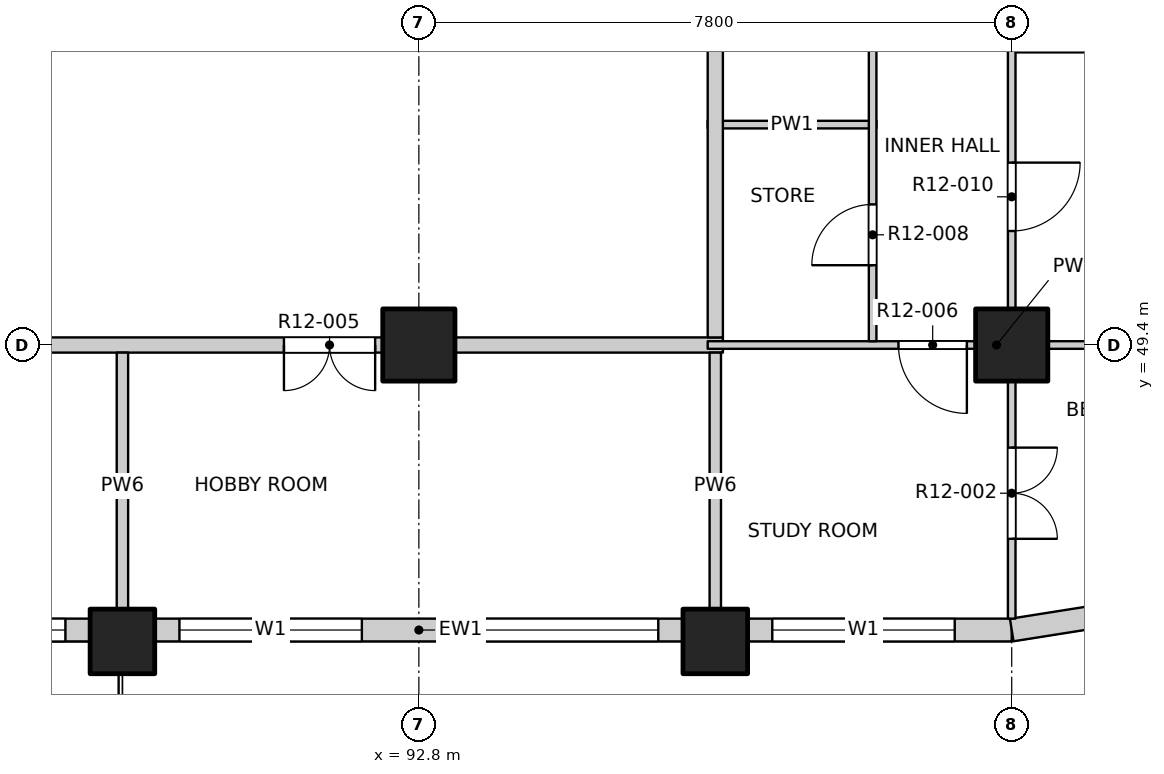
"""IFC4 building model, lengths in metres.
Left out: names, types, materials, properties, quantities, classifications, styles, units other than length and angle.
Written with IfcOpenShell. Run it as: python <this file> out.ifc"""

import sys

from ifc_helpers import new_model, si_unit, direction, frame, frame_2d, origin, origin_2d, place, context, subcontext, project, spatial, rectangle, extrude, element, fill, save


model = new_model("IFC4")
c1 = context("Model", 3, precision=1e-05, world=origin(), true_north=direction((0.0, 1.0)))
c2 = subcontext(c1, "Body", "Model", "MODEL_VIEW")
j1 = project(units=[si_unit("LENGTHUNIT", "METRE"), si_unit("PLANEANGLEUNIT", "RADIAN")], contexts=[c1])
p1 = place(None, origin())
s1 = spatial("IfcSite", under=j1, at=p1, CompositionType="ELEMENT")
p2 = place(p1, origin())
s2 = spatial("IfcBuilding", under=s1, at=p2, CompositionType="ELEMENT")
p3 = place(p2, frame((0.0, 0.0, 137.3)))
s3 = spatial("IfcBuildingStorey", under=s2, at=p3, CompositionType="ELEMENT", Elevation=137.3)
for number, where, z_axis, x_axis in (
    (1, (88.9, 45.5, -0.25), (0.0, 0.0, 1.0), (1.0, 0.0, 0.0)),
    (2, (96.7, 45.5, -0.25), (0.0, 0.0, 1.0), (1.0, 0.0, 0.0)),
):
    element("IfcColumn", number, at=place(p3, frame(where, z_axis=z_axis, x_axis=x_axis)), inside=s3, PredefinedType="COLUMN", context=c2, shape_type="SweptSolid", body=[
        extrude(rectangle(XDim=0.85, YDim=0.85, at=origin_2d()), origin(), (0.0, 0.0, 1.0), 3.4),
    ])
for number, where, z_axis, x_axis in (
    (3, (92.8, 49.4, -0.25), (0.0, 0.0, 1.0), (1.0, 0.0, 0.0)),
    (4, (100.6, 49.4, -0.25), (0.0, 0.0, 1.0), (1.0, 0.0, 0.0)),
):
    element("IfcColumn", number, at=place(p3, frame(where, z_axis=z_axis, x_axis=x_axis)), inside=s3, PredefinedType="COLUMN", context=c2, shape_type="SweptSolid", body=[
        extrude(rectangle(XDim=0.95, YDim=0.95, at=origin_2d()), origin(), (0.0, 0.0, 1.0), 3.4),
    ])
p4 = place(p3, frame((81.525, 45.65, 0.0), z_axis=(0.0, 0.0, 1.0), x_axis=(1.0, 0.0, 0.0)))
e5 = element("IfcWall", 5, at=p4, inside=s3, PredefinedType="SOLIDWALL", context=c2, shape_type="SweptSolid", body=[
    extrude(rectangle(XDim=6.95, YDim=0.3, at=frame_2d((3.475, 0.0))), origin(), (0.0, 0.0, 1.0), 2.7),
])
p5 = place(p4, frame((0.625, 0.0, 0.0)))
e6 = element("IfcOpeningElement", 6, at=p5, cuts=e5, PredefinedType="OPENING", context=c2, shape_type="SweptSolid", body=[
    extrude(rectangle(XDim=1.8, YDim=2.4, at=frame_2d((0.9, 1.2))), frame((0.0, 0.16, 0.0), z_axis=(0.0, -1.0, 0.0), x_axis=(1.0, 0.0, 0.0)), (0.0, 0.0, 1.0), 0.32),
])
p6 = place(p4, frame((4.225, 0.0, 0.9)))
e7 = element("IfcOpeningElement", 7, at=p6, cuts=e5, PredefinedType="OPENING", context=c2, shape_type="SweptSolid", body=[
    extrude(rectangle(XDim=2.4, YDim=1.8, at=frame_2d((1.2, 0.9))), frame((0.0, 0.16, 0.0), z_axis=(0.0, -1.0, 0.0), x_axis=(1.0, 0.0, 0.0)), (0.0, 0.0, 1.0), 0.32),
])
p7 = place(p3, frame((89.325, 45.65, 0.0), z_axis=(0.0, 0.0, 1.0), x_axis=(1.0, 0.0, 0.0)))
e8 = element("IfcWall", 8, at=p7, inside=s3, PredefinedType="SOLIDWALL", context=c2, shape_type="SweptSolid", body=[
    extrude(rectangle(XDim=6.95, YDim=0.3, at=frame_2d((3.475, 0.0))), origin(), (0.0, 0.0, 1.0), 2.7),
])
p8 = place(p7, frame((0.325, 0.0, 0.9)))
e9 = element("IfcOpeningElement", 9, at=p8, cuts=e8, PredefinedType="OPENING", context=c2, shape_type="SweptSolid", body=[
    extrude(rectangle(XDim=2.4, YDim=1.8, at=frame_2d((1.2, 0.9))), frame((0.0, 0.16, 0.0), z_axis=(0.0, -1.0, 0.0), x_axis=(1.0, 0.0, 0.0)), (0.0, 0.0, 1.0), 0.32),
])
p9 = place(p7, frame((4.225, 0.0, 0.9)))
e10 = element("IfcOpeningElement", 10, at=p9, cuts=e8, PredefinedType="OPENING", context=c2, shape_type="SweptSolid", body=[
    extrude(rectangle(XDim=2.4, YDim=1.8, at=frame_2d((1.2, 0.9))), frame((0.0, 0.16, 0.0), z_axis=(0.0, -1.0, 0.0), x_axis=(1.0, 0.0, 0.0)), (0.0, 0.0, 1.0), 0.32),
])
p10 = place(p3, frame((97.125, 45.65, 0.0), z_axis=(0.0, 0.0, 1.0), x_axis=(1.0, 0.0, 0.0)))
e11 = element("IfcWall", 11, at=p10, inside=s3, PredefinedType="SOLIDWALL", context=c2, shape_type="SweptSolid", body=[
    extrude(rectangle(XDim=3.475, YDim=0.3, at=frame_2d((1.738, 0.0))), origin(), (0.0, 0.0, 1.0), 2.7),
])
p11 = place(p10, frame((0.325, 0.0, 0.9)))
e12 = element("IfcOpeningElement", 12, at=p11, cuts=e11, PredefinedType="OPENING", context=c2, shape_type="SweptSolid", body=[
    extrude(rectangle(XDim=2.4, YDim=1.8, at=frame_2d((1.2, 0.9))), frame((0.0, 0.16, 0.0), z_axis=(0.0, -1.0, 0.0), x_axis=(1.0, 0.0, 0.0)), (0.0, 0.0, 1.0), 0.32),
])
p12 = place(p3, frame((100.6, 45.65, 0.0), z_axis=(0.0, 0.0, 1.0), x_axis=(0.987678452879, 0.156496880861, 0.0)))
e13 = element("IfcWall", 13, at=p12, inside=s3, PredefinedType="SOLIDWALL", context=c2, shape_type="SweptSolid", body=[
    extrude(rectangle(XDim=1.173, YDim=0.3, at=frame_2d((0.586, 0.0))), origin(), (0.0, 0.0, 1.0), 2.7),
])
p13 = place(p3, frame((73.2, 49.4, 0.0), z_axis=(0.0, 0.0, 1.0), x_axis=(1.0, 0.0, 0.0)))
e14 = element("IfcWall", 14, at=p13, inside=s3, PredefinedType="PARTITIONING", context=c2, shape_type="SweptSolid", body=[
    extrude(rectangle(XDim=23.6, YDim=0.2, at=frame_2d((11.8, 0.0))), origin(), (0.0, 0.0, 1.0), 3.15),
])
p14 = place(p13, frame((7.3, 0.0, 0.0)))
e15 = element("IfcOpeningElement", 15, at=p14, cuts=e14, PredefinedType="OPENING", context=c2, shape_type="SweptSolid", body=[
    extrude(rectangle(XDim=1.2, YDim=2.1, at=frame_2d((0.6, 1.05))), frame((0.0, 0.11, 0.0), z_axis=(0.0, -1.0, 0.0), x_axis=(1.0, 0.0, 0.0)), (0.0, 0.0, 1.0), 0.22),
])
p15 = place(p13, frame((17.825, 0.0, 0.0)))
e16 = element("IfcOpeningElement", 16, at=p15, cuts=e14, PredefinedType="OPENING", context=c2, shape_type="SweptSolid", body=[
    extrude(rectangle(XDim=1.2, YDim=2.1, at=frame_2d((0.6, 1.05))), frame((0.0, 0.11, 0.0), z_axis=(0.0, -1.0, 0.0), x_axis=(1.0, 0.0, 0.0)), (0.0, 0.0, 1.0), 0.22),
])
p16 = place(p3, frame((96.6, 49.4, 0.0), z_axis=(0.0, 0.0, 1.0), x_axis=(1.0, 0.0, 0.0)))
e17 = element("IfcWall", 17, at=p16, inside=s3, PredefinedType="PARTITIONING", context=c2, shape_type="SweptSolid", body=[
    extrude(rectangle(XDim=7.6, YDim=0.1, at=frame_2d((3.8, 0.0))), origin(), (0.0, 0.0, 1.0), 3.15),
])
p17 = place(p16, frame((2.51, 0.0, 0.0)))
e18 = element("IfcOpeningElement", 18, at=p17, cuts=e17, PredefinedType="OPENING", context=c2, shape_type="SweptSolid", body=[
    extrude(rectangle(XDim=0.9, YDim=2.1, at=frame_2d((0.45, 1.05))), frame((0.0, 0.06, 0.0), z_axis=(0.0, -1.0, 0.0), x_axis=(1.0, 0.0, 0.0)), (0.0, 0.0, 1.0), 0.12),
])
p18 = place(p3, frame((96.6, 52.3, 0.0), z_axis=(0.0, 0.0, 1.0), x_axis=(1.0, 0.0, 0.0)))
e19 = element("IfcWall", 19, at=p18, inside=s3, PredefinedType="PARTITIONING", context=c2, shape_type="SweptSolid", body=[
    extrude(rectangle(XDim=2.22, YDim=0.1, at=frame_2d((1.11, 0.0))), origin(), (0.0, 0.0, 1.0), 3.15),
])
p19 = place(p3, frame((88.9, 45.8, 0.0), z_axis=(0.0, 0.0, 1.0), x_axis=(0.0, 1.0, 0.0)))
e20 = element("IfcWall", 20, at=p19, inside=s3, PredefinedType="PARTITIONING", context=c2, shape_type="SweptSolid", body=[
    extrude(rectangle(XDim=3.5, YDim=0.15, at=frame_2d((1.75, 0.0))), origin(), (0.0, 0.0, 1.0), 2.55),
])
p20 = place(p3, frame((96.7, 45.8, 0.0), z_axis=(0.0, 0.0, 1.0), x_axis=(0.0, 1.0, 0.0)))
e21 = element("IfcWall", 21, at=p20, inside=s3, PredefinedType="PARTITIONING", context=c2, shape_type="SweptSolid", body=[
    extrude(rectangle(XDim=3.5, YDim=0.15, at=frame_2d((1.75, 0.0))), origin(), (0.0, 0.0, 1.0), 3.15),
])
p21 = place(p3, frame((96.7, 49.5, 0.0), z_axis=(0.0, 0.0, 1.0), x_axis=(0.0, 1.0, 0.0)))
e22 = element("IfcWall", 22, at=p21, inside=s3, PredefinedType="PARTITIONING", context=c2, shape_type="SweptSolid", body=[
    extrude(rectangle(XDim=34.7, YDim=0.2, at=frame_2d((17.35, 0.0))), origin(), (0.0, 0.0, 1.0), 3.15),
])
p22 = place(p21, frame((13.325, 0.0, 0.0)))
e23 = element("IfcOpeningElement", 23, at=p22, cuts=e22, PredefinedType="OPENING", context=c2, shape_type="SweptSolid", body=[
    extrude(rectangle(XDim=1.0, YDim=2.1, at=frame_2d((0.5, 1.05))), frame((0.0, 0.11, 0.0), z_axis=(0.0, -1.0, 0.0), x_axis=(1.0, 0.0, 0.0)), (0.0, 0.0, 1.0), 0.22),
])
p23 = place(p21, frame((29.625, 0.0, 0.0)))
e24 = element("IfcOpeningElement", 24, at=p23, cuts=e22, PredefinedType="OPENING", context=c2, shape_type="SweptSolid", body=[
    extrude(rectangle(XDim=1.0, YDim=2.1, at=frame_2d((0.5, 1.05))), frame((0.0, 0.11, 0.0), z_axis=(0.0, -1.0, 0.0), x_axis=(1.0, 0.0, 0.0)), (0.0, 0.0, 1.0), 0.22),
])
p24 = place(p3, frame((98.77, 49.45, 0.0), z_axis=(0.0, 0.0, 1.0), x_axis=(0.0, 1.0, 0.0)))
e25 = element("IfcWall", 25, at=p24, inside=s3, PredefinedType="PARTITIONING", context=c2, shape_type="SweptSolid", body=[
    extrude(rectangle(XDim=12.05, YDim=0.1, at=frame_2d((6.025, 0.0))), origin(), (0.0, 0.0, 1.0), 3.15),
])
p25 = place(p24, frame((1.0, 0.0, 0.0)))
e26 = element("IfcOpeningElement", 26, at=p25, cuts=e25, PredefinedType="OPENING", context=c2, shape_type="SweptSolid", body=[
    extrude(rectangle(XDim=0.8, YDim=2.1, at=frame_2d((0.4, 1.05))), frame((0.0, 0.06, 0.0), z_axis=(0.0, -1.0, 0.0), x_axis=(1.0, 0.0, 0.0)), (0.0, 0.0, 1.0), 0.12),
])
p26 = place(p24, frame((3.825, 0.0, 0.0)))
e27 = element("IfcOpeningElement", 27, at=p26, cuts=e25, PredefinedType="OPENING", context=c2, shape_type="SweptSolid", body=[
    extrude(rectangle(XDim=0.8, YDim=2.1, at=frame_2d((0.4, 1.05))), frame((0.0, 0.06, 0.0), z_axis=(0.0, -1.0, 0.0), x_axis=(1.0, 0.0, 0.0)), (0.0, 0.0, 1.0), 0.12),
])
p27 = place(p24, frame((6.05, 0.0, 0.0)))
e28 = element("IfcOpeningElement", 28, at=p27, cuts=e25, PredefinedType="OPENING", context=c2, shape_type="SweptSolid", body=[
    extrude(rectangle(XDim=0.9, YDim=2.1, at=frame_2d((0.45, 1.05))), frame((0.0, 0.06, 0.0), z_axis=(0.0, -1.0, 0.0), x_axis=(1.0, 0.0, 0.0)), (0.0, 0.0, 1.0), 0.12),
])
p28 = place(p24, frame((8.15, 0.0, 0.0)))
e29 = element("IfcOpeningElement", 29, at=p28, cuts=e25, PredefinedType="OPENING", context=c2, shape_type="SweptSolid", body=[
    extrude(rectangle(XDim=0.8, YDim=2.1, at=frame_2d((0.4, 1.05))), frame((0.0, 0.06, 0.0), z_axis=(0.0, -1.0, 0.0), x_axis=(1.0, 0.0, 0.0)), (0.0, 0.0, 1.0), 0.12),
])
p29 = place(p24, frame((10.45, 0.0, 0.0)))
e30 = element("IfcOpeningElement", 30, at=p29, cuts=e25, PredefinedType="OPENING", context=c2, shape_type="SweptSolid", body=[
    extrude(rectangle(XDim=0.9, YDim=2.1, at=frame_2d((0.45, 1.05))), frame((0.0, 0.06, 0.0), z_axis=(0.0, -1.0, 0.0), x_axis=(1.0, 0.0, 0.0)), (0.0, 0.0, 1.0), 0.12),
])
p30 = place(p3, frame((100.6, 45.8, 0.0), z_axis=(0.0, 0.0, 1.0), x_axis=(0.0, 1.0, 0.0)))
e31 = element("IfcWall", 31, at=p30, inside=s3, PredefinedType="PARTITIONING", context=c2, shape_type="SweptSolid", body=[
    extrude(rectangle(XDim=38.4, YDim=0.1, at=frame_2d((19.2, 0.0))), origin(), (0.0, 0.0, 1.0), 3.15),
])
p31 = place(p30, frame((1.05, 0.0, 0.0)))
e32 = element("IfcOpeningElement", 32, at=p31, cuts=e31, PredefinedType="OPENING", context=c2, shape_type="SweptSolid", body=[
    extrude(rectangle(XDim=1.2, YDim=2.1, at=frame_2d((0.6, 1.05))), frame((0.0, 0.06, 0.0), z_axis=(0.0, -1.0, 0.0), x_axis=(1.0, 0.0, 0.0)), (0.0, 0.0, 1.0), 0.12),
])
p32 = place(p30, frame((5.1, 0.0, 0.0)))
e33 = element("IfcOpeningElement", 33, at=p32, cuts=e31, PredefinedType="OPENING", context=c2, shape_type="SweptSolid", body=[
    extrude(rectangle(XDim=0.9, YDim=2.1, at=frame_2d((0.45, 1.05))), frame((0.0, 0.06, 0.0), z_axis=(0.0, -1.0, 0.0), x_axis=(1.0, 0.0, 0.0)), (0.0, 0.0, 1.0), 0.12),
])
p33 = place(p30, frame((9.0, 0.0, 0.0)))
e34 = element("IfcOpeningElement", 34, at=p33, cuts=e31, PredefinedType="OPENING", context=c2, shape_type="SweptSolid", body=[
    extrude(rectangle(XDim=0.9, YDim=2.1, at=frame_2d((0.45, 1.05))), frame((0.0, 0.06, 0.0), z_axis=(0.0, -1.0, 0.0), x_axis=(1.0, 0.0, 0.0)), (0.0, 0.0, 1.0), 0.12),
])
p34 = place(p30, frame((12.9, 0.0, 0.0)))
e35 = element("IfcOpeningElement", 35, at=p34, cuts=e31, PredefinedType="OPENING", context=c2, shape_type="SweptSolid", body=[
    extrude(rectangle(XDim=0.9, YDim=2.1, at=frame_2d((0.45, 1.05))), frame((0.0, 0.06, 0.0), z_axis=(0.0, -1.0, 0.0), x_axis=(1.0, 0.0, 0.0)), (0.0, 0.0, 1.0), 0.12),
])
p35 = place(p30, frame((16.8, 0.0, 0.0)))
e36 = element("IfcOpeningElement", 36, at=p35, cuts=e31, PredefinedType="OPENING", context=c2, shape_type="SweptSolid", body=[
    extrude(rectangle(XDim=0.9, YDim=2.1, at=frame_2d((0.45, 1.05))), frame((0.0, 0.06, 0.0), z_axis=(0.0, -1.0, 0.0), x_axis=(1.0, 0.0, 0.0)), (0.0, 0.0, 1.0), 0.12),
])
p36 = place(p30, frame((20.7, 0.0, 0.0)))
e37 = element("IfcOpeningElement", 37, at=p36, cuts=e31, PredefinedType="OPENING", context=c2, shape_type="SweptSolid", body=[
    extrude(rectangle(XDim=0.9, YDim=2.1, at=frame_2d((0.45, 1.05))), frame((0.0, 0.06, 0.0), z_axis=(0.0, -1.0, 0.0), x_axis=(1.0, 0.0, 0.0)), (0.0, 0.0, 1.0), 0.12),
])
p37 = place(p30, frame((24.6, 0.0, 0.0)))
e38 = element("IfcOpeningElement", 38, at=p37, cuts=e31, PredefinedType="OPENING", context=c2, shape_type="SweptSolid", body=[
    extrude(rectangle(XDim=0.9, YDim=2.1, at=frame_2d((0.45, 1.05))), frame((0.0, 0.06, 0.0), z_axis=(0.0, -1.0, 0.0), x_axis=(1.0, 0.0, 0.0)), (0.0, 0.0, 1.0), 0.12),
])
p38 = place(p30, frame((28.5, 0.0, 0.0)))
e39 = element("IfcOpeningElement", 39, at=p38, cuts=e31, PredefinedType="OPENING", context=c2, shape_type="SweptSolid", body=[
    extrude(rectangle(XDim=0.9, YDim=2.1, at=frame_2d((0.45, 1.05))), frame((0.0, 0.06, 0.0), z_axis=(0.0, -1.0, 0.0), x_axis=(1.0, 0.0, 0.0)), (0.0, 0.0, 1.0), 0.12),
])
p39 = place(p30, frame((32.4, 0.0, 0.0)))
e40 = element("IfcOpeningElement", 40, at=p39, cuts=e31, PredefinedType="OPENING", context=c2, shape_type="SweptSolid", body=[
    extrude(rectangle(XDim=0.9, YDim=2.1, at=frame_2d((0.45, 1.05))), frame((0.0, 0.06, 0.0), z_axis=(0.0, -1.0, 0.0), x_axis=(1.0, 0.0, 0.0)), (0.0, 0.0, 1.0), 0.12),
])
p40 = place(p30, frame((36.15, 0.0, 0.0)))
e41 = element("IfcOpeningElement", 41, at=p40, cuts=e31, PredefinedType="OPENING", context=c2, shape_type="SweptSolid", body=[
    extrude(rectangle(XDim=1.2, YDim=2.1, at=frame_2d((0.6, 1.05))), frame((0.0, 0.06, 0.0), z_axis=(0.0, -1.0, 0.0), x_axis=(1.0, 0.0, 0.0)), (0.0, 0.0, 1.0), 0.12),
])
p41 = place(p6, origin())
e42 = element("IfcWindow", 42, at=p41, inside=s3, PartitioningType="DOUBLE_PANEL_VERTICAL", PredefinedType="WINDOW", context=c2, shape_type="SweptSolid", body=[
    extrude(rectangle(XDim=2.4, YDim=1.8, at=frame_2d((1.2, 0.9))), frame((0.0, 0.03, 0.0), z_axis=(0.0, -1.0, 0.0), x_axis=(1.0, 0.0, 0.0)), (0.0, 0.0, 1.0), 0.06),
])
fill(e7, e42)
p42 = place(p8, origin())
e43 = element("IfcWindow", 43, at=p42, inside=s3, PartitioningType="DOUBLE_PANEL_VERTICAL", PredefinedType="WINDOW", context=c2, shape_type="SweptSolid", body=[
    extrude(rectangle(XDim=2.4, YDim=1.8, at=frame_2d((1.2, 0.9))), frame((0.0, 0.03, 0.0), z_axis=(0.0, -1.0, 0.0), x_axis=(1.0, 0.0, 0.0)), (0.0, 0.0, 1.0), 0.06),
])
fill(e9, e43)
p43 = place(p9, origin())
e44 = element("IfcWindow", 44, at=p43, inside=s3, PartitioningType="DOUBLE_PANEL_VERTICAL", PredefinedType="WINDOW", context=c2, shape_type="SweptSolid", body=[
    extrude(rectangle(XDim=2.4, YDim=1.8, at=frame_2d((1.2, 0.9))), frame((0.0, 0.03, 0.0), z_axis=(0.0, -1.0, 0.0), x_axis=(1.0, 0.0, 0.0)), (0.0, 0.0, 1.0), 0.06),
])
fill(e10, e44)
p44 = place(p11, origin())
e45 = element("IfcWindow", 45, at=p44, inside=s3, PartitioningType="DOUBLE_PANEL_VERTICAL", PredefinedType="WINDOW", context=c2, shape_type="SweptSolid", body=[
    extrude(rectangle(XDim=2.4, YDim=1.8, at=frame_2d((1.2, 0.9))), frame((0.0, 0.03, 0.0), z_axis=(0.0, -1.0, 0.0), x_axis=(1.0, 0.0, 0.0)), (0.0, 0.0, 1.0), 0.06),
])
fill(e12, e45)
p45 = place(p31, origin())
e46 = element("IfcDoor", 46, at=p45, inside=s3, OperationType="DOUBLE_DOOR_SINGLE_SWING", PredefinedType="DOOR", context=c2, shape_type="SweptSolid", body=[
    extrude(rectangle(XDim=1.2, YDim=2.1, at=frame_2d((0.6, 1.05))), frame((0.0, 0.025, 0.0), z_axis=(0.0, -1.0, 0.0), x_axis=(1.0, 0.0, 0.0)), (0.0, 0.0, 1.0), 0.05),
])
fill(e32, e46)
p46 = place(p15, origin())
e47 = element("IfcDoor", 47, at=p46, inside=s3, OperationType="DOUBLE_DOOR_SINGLE_SWING", PredefinedType="DOOR", context=c2, shape_type="SweptSolid", body=[
    extrude(rectangle(XDim=1.2, YDim=2.1, at=frame_2d((0.6, 1.05))), frame((0.0, 0.025, 0.0), z_axis=(0.0, -1.0, 0.0), x_axis=(1.0, 0.0, 0.0)), (0.0, 0.0, 1.0), 0.05),
])
fill(e16, e47)
p47 = place(p17, origin())
e48 = element("IfcDoor", 48, at=p47, inside=s3, OperationType="SINGLE_SWING_LEFT", PredefinedType="DOOR", context=c2, shape_type="SweptSolid", body=[
    extrude(rectangle(XDim=0.9, YDim=2.1, at=frame_2d((0.45, 1.05))), frame((0.0, 0.025, 0.0), z_axis=(0.0, -1.0, 0.0), x_axis=(1.0, 0.0, 0.0)), (0.0, 0.0, 1.0), 0.05),
])
fill(e18, e48)
p48 = place(p25, origin())
e49 = element("IfcDoor", 49, at=p48, inside=s3, OperationType="SINGLE_SWING_LEFT", PredefinedType="DOOR", context=c2, shape_type="SweptSolid", body=[
    extrude(rectangle(XDim=0.8, YDim=2.1, at=frame_2d((0.4, 1.05))), frame((0.0, 0.025, 0.0), z_axis=(0.0, -1.0, 0.0), x_axis=(1.0, 0.0, 0.0)), (0.0, 0.0, 1.0), 0.05),
])
fill(e26, e49)
p49 = place(p32, origin())
e50 = element("IfcDoor", 50, at=p49, inside=s3, OperationType="SINGLE_SWING_LEFT", PredefinedType="DOOR", context=c2, shape_type="SweptSolid", body=[
    extrude(rectangle(XDim=0.9, YDim=2.1, at=frame_2d((0.45, 1.05))), frame((0.0, 0.025, 0.0), z_axis=(0.0, -1.0, 0.0), x_axis=(1.0, 0.0, 0.0)), (0.0, 0.0, 1.0), 0.05),
])
fill(e33, e50)
save(model, sys.argv[1])
